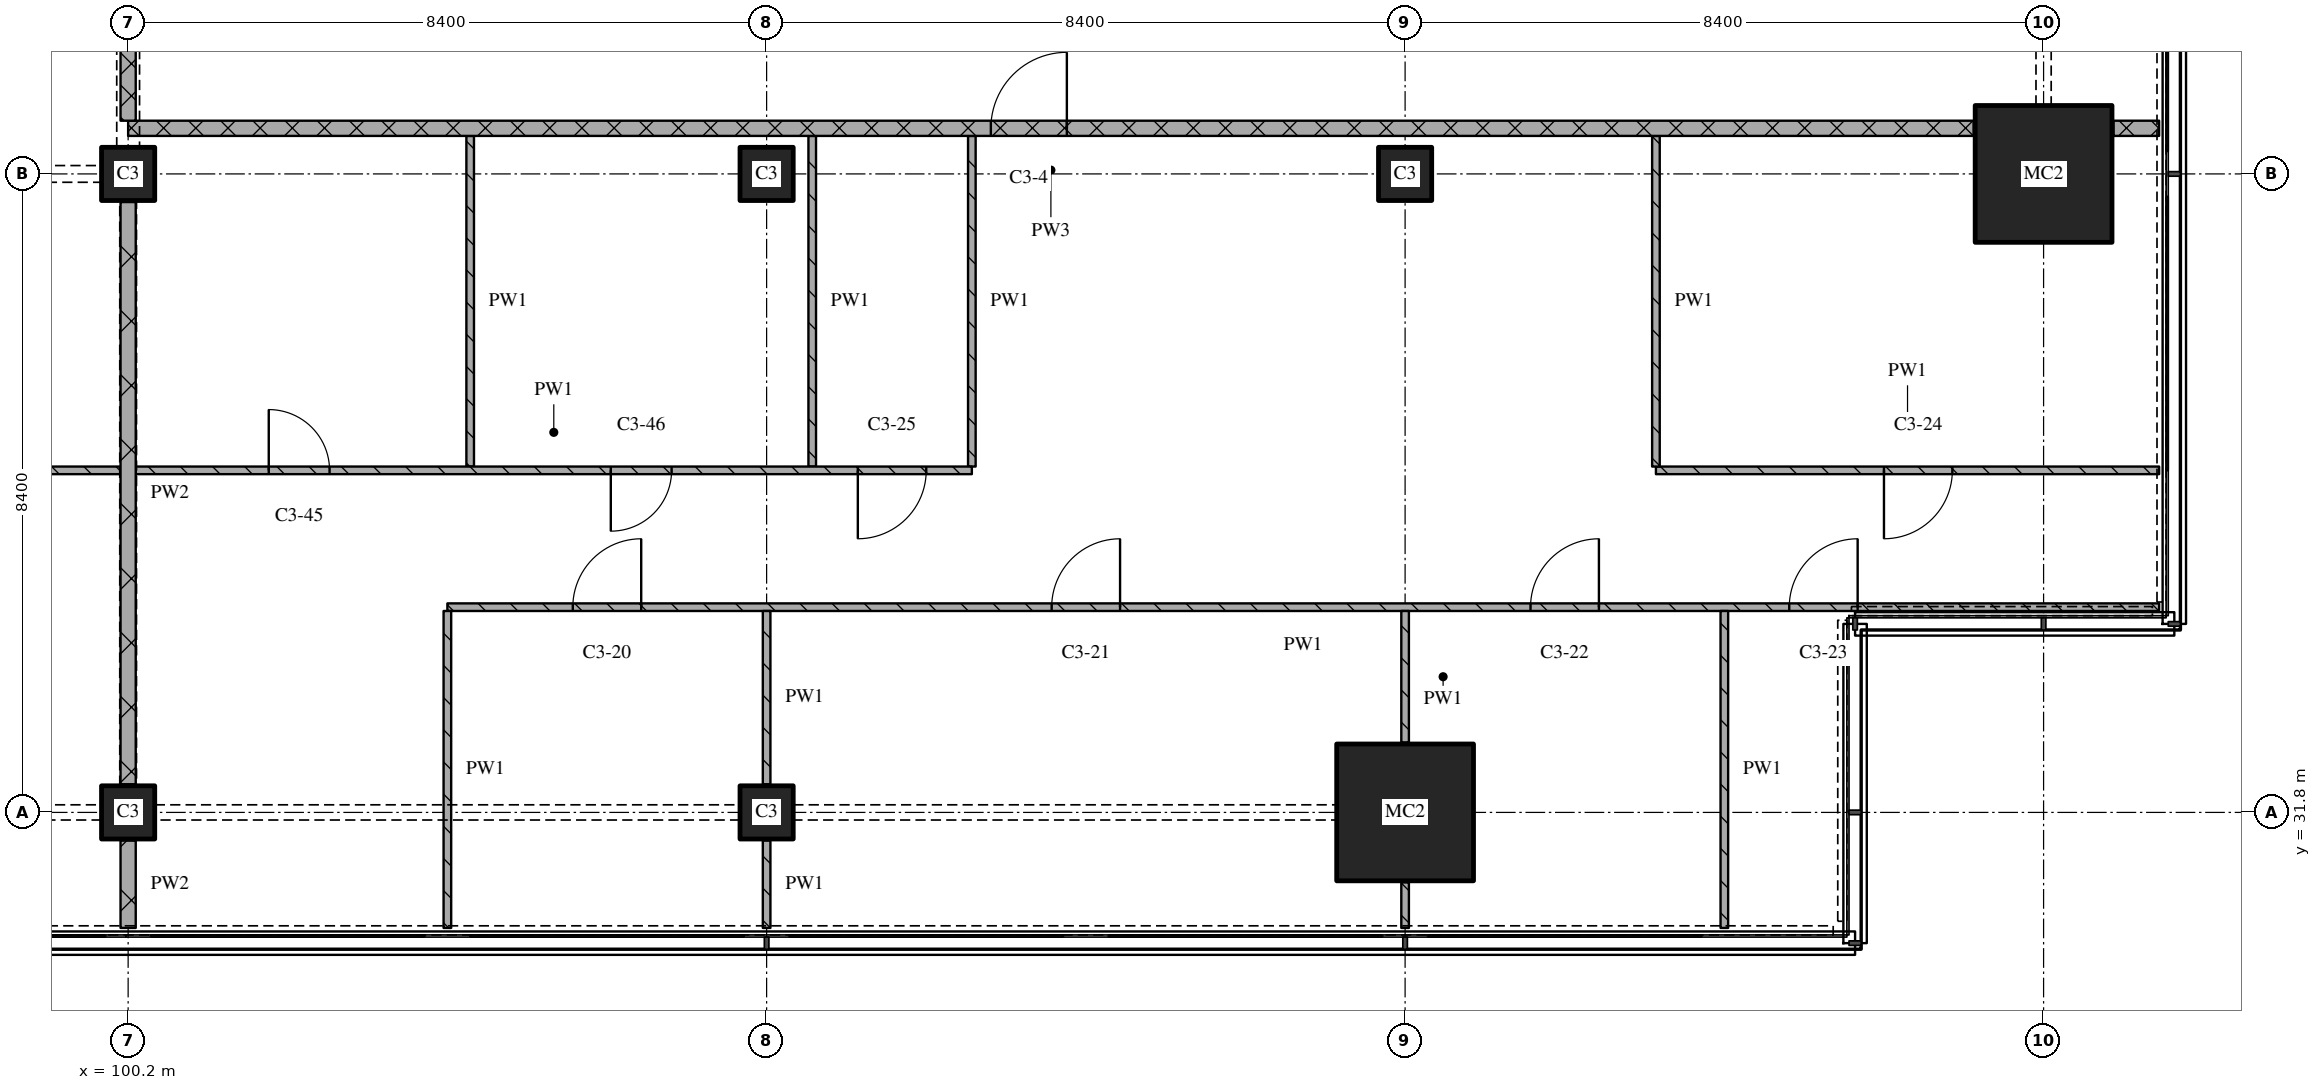
"""IFC4 building model, lengths in metres.
Left out: names, types, materials, properties, quantities, classifications, styles, units other than length and angle.
Written with IfcOpenShell. Run it as: python <this file> out.ifc"""

import sys

from ifc_helpers import new_model, si_unit, direction, frame, frame_2d, origin, origin_2d, place, context, subcontext, project, spatial, rectangle, extrude, element, fill, save


model = new_model("IFC4")
c1 = context("Model", 3, precision=1e-05, world=origin(), true_north=direction((0.0, 1.0)))
c2 = subcontext(c1, "Body", "Model", "MODEL_VIEW")
j1 = project(units=[si_unit("LENGTHUNIT", "METRE"), si_unit("PLANEANGLEUNIT", "RADIAN")], contexts=[c1])
p1 = place(None, origin())
s1 = spatial("IfcSite", under=j1, at=p1, CompositionType="ELEMENT")
p2 = place(p1, origin())
s2 = spatial("IfcBuilding", under=s1, at=p2, CompositionType="ELEMENT")
p3 = place(p2, frame((0.0, 0.0, 176.25)))
s3 = spatial("IfcBuildingStorey", under=s2, at=p3, CompositionType="ELEMENT", Elevation=176.25)
for number, where, z_axis, x_axis in (
    (1, (100.2, 31.8, 0.0), (0.0, 0.0, 1.0), (1.0, 0.0, 0.0)),
    (2, (100.2, 40.2, 0.0), (0.0, 0.0, 1.0), (1.0, 0.0, 0.0)),
    (3, (108.6, 31.8, 0.0), (0.0, 0.0, 1.0), (1.0, 0.0, 0.0)),
    (4, (108.6, 40.2, 0.0), (0.0, 0.0, 1.0), (1.0, 0.0, 0.0)),
):
    element("IfcColumn", number, at=place(p3, frame(where, z_axis=z_axis, x_axis=x_axis)), inside=s3, PredefinedType="COLUMN", context=c2, shape_type="SweptSolid", body=[
        extrude(rectangle(XDim=0.7, YDim=0.7, at=origin_2d()), origin(), (0.0, 0.0, 1.0), 3.6),
    ])
p4 = place(p3, frame((117.0, 31.8, 0.0), z_axis=(0.0, 0.0, 1.0), x_axis=(1.0, 0.0, 0.0)))
e5 = element("IfcColumn", 5, at=p4, inside=s3, PredefinedType="COLUMN", context=c2, shape_type="SweptSolid", body=[
    extrude(rectangle(XDim=1.8, YDim=1.8, at=origin_2d()), origin(), (0.0, 0.0, 1.0), 3.6),
])
p5 = place(p3, frame((117.0, 40.2, 0.0), z_axis=(0.0, 0.0, 1.0), x_axis=(1.0, 0.0, 0.0)))
e6 = element("IfcColumn", 6, at=p5, inside=s3, PredefinedType="COLUMN", context=c2, shape_type="SweptSolid", body=[
    extrude(rectangle(XDim=0.7, YDim=0.7, at=origin_2d()), origin(), (0.0, 0.0, 1.0), 3.6),
])
p6 = place(p3, frame((125.4, 40.2, 0.0), z_axis=(0.0, 0.0, 1.0), x_axis=(1.0, 0.0, 0.0)))
e7 = element("IfcColumn", 7, at=p6, inside=s3, PredefinedType="COLUMN", context=c2, shape_type="SweptSolid", body=[
    extrude(rectangle(XDim=1.8, YDim=1.8, at=origin_2d()), origin(), (0.0, 0.0, 1.0), 3.6),
])
p7 = place(p3, frame((126.92, 34.5, 0.0), z_axis=(0.0, 0.0, 1.0), x_axis=(-1.0, 0.0, 0.0)))
e8 = element("IfcWall", 8, at=p7, inside=s3, PredefinedType="PARTITIONING", context=c2, shape_type="SweptSolid", body=[
    extrude(rectangle(XDim=22.52, YDim=0.1, at=frame_2d((11.26, 0.0))), origin(), (0.0, 0.0, 1.0), 3.32),
])
p8 = place(p7, frame((3.966, 0.0, 0.0)))
e9 = element("IfcOpeningElement", 9, at=p8, cuts=e8, PredefinedType="OPENING", context=c2, shape_type="SweptSolid", body=[
    extrude(rectangle(XDim=0.9, YDim=2.1, at=frame_2d((0.45, 1.05))), frame((0.0, 0.06, 0.0), z_axis=(0.0, -1.0, 0.0), x_axis=(1.0, 0.0, 0.0)), (0.0, 0.0, 1.0), 0.12),
])
p9 = place(p7, frame((7.37, 0.0, 0.0)))
e10 = element("IfcOpeningElement", 10, at=p9, cuts=e8, PredefinedType="OPENING", context=c2, shape_type="SweptSolid", body=[
    extrude(rectangle(XDim=0.9, YDim=2.1, at=frame_2d((0.45, 1.05))), frame((0.0, 0.06, 0.0), z_axis=(0.0, -1.0, 0.0), x_axis=(1.0, 0.0, 0.0)), (0.0, 0.0, 1.0), 0.12),
])
p10 = place(p7, frame((13.67, 0.0, 0.0)))
e11 = element("IfcOpeningElement", 11, at=p10, cuts=e8, PredefinedType="OPENING", context=c2, shape_type="SweptSolid", body=[
    extrude(rectangle(XDim=0.9, YDim=2.1, at=frame_2d((0.45, 1.05))), frame((0.0, 0.06, 0.0), z_axis=(0.0, -1.0, 0.0), x_axis=(1.0, 0.0, 0.0)), (0.0, 0.0, 1.0), 0.12),
])
p11 = place(p7, frame((19.97, 0.0, 0.0)))
e12 = element("IfcOpeningElement", 12, at=p11, cuts=e8, PredefinedType="OPENING", context=c2, shape_type="SweptSolid", body=[
    extrude(rectangle(XDim=0.9, YDim=2.1, at=frame_2d((0.45, 1.05))), frame((0.0, 0.06, 0.0), z_axis=(0.0, -1.0, 0.0), x_axis=(1.0, 0.0, 0.0)), (0.0, 0.0, 1.0), 0.12),
])
p12 = place(p3, frame((120.3, 36.3, 0.0), z_axis=(0.0, 0.0, 1.0), x_axis=(1.0, 0.0, 0.0)))
e13 = element("IfcWall", 13, at=p12, inside=s3, PredefinedType="PARTITIONING", context=c2, shape_type="SweptSolid", body=[
    extrude(rectangle(XDim=6.62, YDim=0.1, at=frame_2d((3.31, 0.0))), origin(), (0.0, 0.0, 1.0), 3.32),
])
p13 = place(p12, frame((3.0, 0.0, 0.0)))
e14 = element("IfcOpeningElement", 14, at=p13, cuts=e13, PredefinedType="OPENING", context=c2, shape_type="SweptSolid", body=[
    extrude(rectangle(XDim=0.9, YDim=2.1, at=frame_2d((0.45, 1.05))), frame((0.0, 0.06, 0.0), z_axis=(0.0, -1.0, 0.0), x_axis=(1.0, 0.0, 0.0)), (0.0, 0.0, 1.0), 0.12),
])
p14 = place(p3, frame((124.48, 40.8, 0.0), z_axis=(0.0, 0.0, 1.0), x_axis=(-1.0, 0.0, 0.0)))
e15 = element("IfcWall", 15, at=p14, inside=s3, PredefinedType="PARTITIONING", context=c2, shape_type="SweptSolid", body=[
    extrude(rectangle(XDim=24.28, YDim=0.2, at=frame_2d((12.14, 0.0))), origin(), (0.0, 0.0, 1.0), 3.32),
])
p15 = place(p14, frame((11.93, 0.0, 0.0)))
e16 = element("IfcOpeningElement", 16, at=p15, cuts=e15, PredefinedType="OPENING", context=c2, shape_type="SweptSolid", body=[
    extrude(rectangle(XDim=1.0, YDim=2.1, at=frame_2d((0.5, 1.05))), frame((0.0, 0.11, 0.0), z_axis=(0.0, -1.0, 0.0), x_axis=(1.0, 0.0, 0.0)), (0.0, 0.0, 1.0), 0.22),
])
p16 = place(p3, frame((126.32, 40.8, 0.0), z_axis=(0.0, 0.0, 1.0), x_axis=(1.0, 0.0, 0.0)))
e17 = element("IfcWall", 17, at=p16, inside=s3, PredefinedType="PARTITIONING", context=c2, shape_type="SweptSolid", body=[
    extrude(rectangle(XDim=0.6, YDim=0.2, at=frame_2d((0.3, 0.0))), origin(), (0.0, 0.0, 1.0), 3.32),
])
p17 = place(p3, frame((100.2, 43.1, 0.0), z_axis=(0.0, 0.0, 1.0), x_axis=(0.0, -1.0, 0.0)))
e18 = element("IfcWall", 18, at=p17, inside=s3, PredefinedType="PARTITIONING", context=c2, shape_type="SweptSolid", body=[
    extrude(rectangle(XDim=2.2, YDim=0.2, at=frame_2d((1.1, 0.0))), origin(), (0.0, 0.0, 1.0), 2.43),
])
p18 = place(p3, frame((100.2, 31.43, 0.0), z_axis=(0.0, 0.0, 1.0), x_axis=(0.0, -1.0, 0.0)))
e19 = element("IfcWall", 19, at=p18, inside=s3, PredefinedType="PARTITIONING", context=c2, shape_type="SweptSolid", body=[
    extrude(rectangle(XDim=1.15, YDim=0.2, at=frame_2d((0.575, 0.0))), origin(), (0.0, 0.0, 1.0), 3.32),
])
p19 = place(p3, frame((100.2, 39.83, 0.0), z_axis=(0.0, 0.0, 1.0), x_axis=(0.0, -1.0, 0.0)))
e20 = element("IfcWall", 20, at=p19, inside=s3, PredefinedType="PARTITIONING", context=c2, shape_type="SweptSolid", body=[
    extrude(rectangle(XDim=7.66, YDim=0.2, at=frame_2d((3.83, 0.0))), origin(), (0.0, 0.0, 1.0), 2.72),
])
p20 = place(p3, frame((104.4, 34.45, 0.0), z_axis=(0.0, 0.0, 1.0), x_axis=(0.0, -1.0, 0.0)))
e21 = element("IfcWall", 21, at=p20, inside=s3, PredefinedType="PARTITIONING", context=c2, shape_type="SweptSolid", body=[
    extrude(rectangle(XDim=4.17, YDim=0.1, at=frame_2d((2.085, 0.0))), origin(), (0.0, 0.0, 1.0), 3.32),
])
p21 = place(p3, frame((104.7, 40.7, 0.0), z_axis=(0.0, 0.0, 1.0), x_axis=(0.0, -1.0, 0.0)))
e22 = element("IfcWall", 22, at=p21, inside=s3, PredefinedType="PARTITIONING", context=c2, shape_type="SweptSolid", body=[
    extrude(rectangle(XDim=4.35, YDim=0.1, at=frame_2d((2.175, 0.0))), origin(), (0.0, 0.0, 1.0), 3.32),
])
p22 = place(p3, frame((108.6, 31.43, 0.0), z_axis=(0.0, 0.0, 1.0), x_axis=(0.0, -1.0, 0.0)))
e23 = element("IfcWall", 23, at=p22, inside=s3, PredefinedType="PARTITIONING", context=c2, shape_type="SweptSolid", body=[
    extrude(rectangle(XDim=1.15, YDim=0.1, at=frame_2d((0.575, 0.0))), origin(), (0.0, 0.0, 1.0), 3.32),
])
p23 = place(p3, frame((108.6, 34.45, 0.0), z_axis=(0.0, 0.0, 1.0), x_axis=(0.0, -1.0, 0.0)))
e24 = element("IfcWall", 24, at=p23, inside=s3, PredefinedType="PARTITIONING", context=c2, shape_type="SweptSolid", body=[
    extrude(rectangle(XDim=2.28, YDim=0.1, at=frame_2d((1.14, 0.0))), origin(), (0.0, 0.0, 1.0), 3.32),
])
for number, where, z_axis, x_axis in (
    (25, (109.2, 40.7, 0.0), (0.0, 0.0, 1.0), (0.0, -1.0, 0.0)),
    (26, (111.3, 40.7, 0.0), (0.0, 0.0, 1.0), (0.0, -1.0, 0.0)),
):
    element("IfcWall", number, at=place(p3, frame(where, z_axis=z_axis, x_axis=x_axis)), inside=s3, PredefinedType="PARTITIONING", context=c2, shape_type="SweptSolid", body=[
        extrude(rectangle(XDim=4.35, YDim=0.1, at=frame_2d((2.175, 0.0))), origin(), (0.0, 0.0, 1.0), 3.32),
    ])
p24 = place(p3, frame((117.0, 30.88, 0.0), z_axis=(0.0, 0.0, 1.0), x_axis=(0.0, -1.0, 0.0)))
e27 = element("IfcWall", 27, at=p24, inside=s3, PredefinedType="PARTITIONING", context=c2, shape_type="SweptSolid", body=[
    extrude(rectangle(XDim=0.6, YDim=0.1, at=frame_2d((0.3, 0.0))), origin(), (0.0, 0.0, 1.0), 3.32),
])
p25 = place(p3, frame((117.0, 34.45, 0.0), z_axis=(0.0, 0.0, 1.0), x_axis=(0.0, -1.0, 0.0)))
e28 = element("IfcWall", 28, at=p25, inside=s3, PredefinedType="PARTITIONING", context=c2, shape_type="SweptSolid", body=[
    extrude(rectangle(XDim=1.73, YDim=0.1, at=frame_2d((0.865, 0.0))), origin(), (0.0, 0.0, 1.0), 3.32),
])
p26 = place(p3, frame((120.3, 40.7, 0.0), z_axis=(0.0, 0.0, 1.0), x_axis=(0.0, -1.0, 0.0)))
e29 = element("IfcWall", 29, at=p26, inside=s3, PredefinedType="PARTITIONING", context=c2, shape_type="SweptSolid", body=[
    extrude(rectangle(XDim=4.35, YDim=0.1, at=frame_2d((2.175, 0.0))), origin(), (0.0, 0.0, 1.0), 3.32),
])
p27 = place(p3, frame((121.2, 34.45, 0.0), z_axis=(0.0, 0.0, 1.0), x_axis=(0.0, -1.0, 0.0)))
e30 = element("IfcWall", 30, at=p27, inside=s3, PredefinedType="PARTITIONING", context=c2, shape_type="SweptSolid", body=[
    extrude(rectangle(XDim=4.17, YDim=0.1, at=frame_2d((2.085, 0.0))), origin(), (0.0, 0.0, 1.0), 3.32),
])
p28 = place(p3, frame((100.1, 36.3, 0.0), z_axis=(0.0, 0.0, 1.0), x_axis=(-1.0, 0.0, 0.0)))
e31 = element("IfcWall", 31, at=p28, inside=s3, PredefinedType="PARTITIONING", context=c2, shape_type="SweptSolid", body=[
    extrude(rectangle(XDim=4.1, YDim=0.1, at=frame_2d((2.05, 0.0))), origin(), (0.0, 0.0, 1.0), 3.32),
])
p29 = place(p28, frame((1.55, 0.0, 0.0)))
e32 = element("IfcOpeningElement", 32, at=p29, cuts=e31, PredefinedType="OPENING", context=c2, shape_type="SweptSolid", body=[
    extrude(rectangle(XDim=0.9, YDim=2.1, at=frame_2d((0.45, 1.05))), frame((0.0, 0.06, 0.0), z_axis=(0.0, -1.0, 0.0), x_axis=(1.0, 0.0, 0.0)), (0.0, 0.0, 1.0), 0.12),
])
p30 = place(p3, frame((100.3, 36.3, 0.0), z_axis=(0.0, 0.0, 1.0), x_axis=(1.0, 0.0, 0.0)))
e33 = element("IfcWall", 33, at=p30, inside=s3, PredefinedType="PARTITIONING", context=c2, shape_type="SweptSolid", body=[
    extrude(rectangle(XDim=11.0, YDim=0.1, at=frame_2d((5.5, 0.0))), origin(), (0.0, 0.0, 1.0), 3.32),
])
p31 = place(p30, frame((1.75, 0.0, 0.0)))
e34 = element("IfcOpeningElement", 34, at=p31, cuts=e33, PredefinedType="OPENING", context=c2, shape_type="SweptSolid", body=[
    extrude(rectangle(XDim=0.8, YDim=2.1, at=frame_2d((0.4, 1.05))), frame((0.0, 0.06, 0.0), z_axis=(0.0, -1.0, 0.0), x_axis=(1.0, 0.0, 0.0)), (0.0, 0.0, 1.0), 0.12),
])
p32 = place(p30, frame((6.25, 0.0, 0.0)))
e35 = element("IfcOpeningElement", 35, at=p32, cuts=e33, PredefinedType="OPENING", context=c2, shape_type="SweptSolid", body=[
    extrude(rectangle(XDim=0.8, YDim=2.1, at=frame_2d((0.4, 1.05))), frame((0.0, 0.06, 0.0), z_axis=(0.0, -1.0, 0.0), x_axis=(1.0, 0.0, 0.0)), (0.0, 0.0, 1.0), 0.12),
])
p33 = place(p30, frame((9.5, 0.0, 0.0)))
e36 = element("IfcOpeningElement", 36, at=p33, cuts=e33, PredefinedType="OPENING", context=c2, shape_type="SweptSolid", body=[
    extrude(rectangle(XDim=0.9, YDim=2.1, at=frame_2d((0.45, 1.05))), frame((0.0, 0.06, 0.0), z_axis=(0.0, -1.0, 0.0), x_axis=(1.0, 0.0, 0.0)), (0.0, 0.0, 1.0), 0.12),
])
p34 = place(p8, origin())
e37 = element("IfcDoor", 37, at=p34, inside=s3, OperationType="SINGLE_SWING_RIGHT", PredefinedType="DOOR", context=c2, shape_type="SweptSolid", body=[
    extrude(rectangle(XDim=0.9, YDim=2.1, at=frame_2d((0.45, 1.05))), frame((0.0, 0.025, 0.0), z_axis=(0.0, -1.0, 0.0), x_axis=(1.0, 0.0, 0.0)), (0.0, 0.0, 1.0), 0.05),
])
fill(e9, e37)
p35 = place(p9, origin())
e38 = element("IfcDoor", 38, at=p35, inside=s3, OperationType="SINGLE_SWING_RIGHT", PredefinedType="DOOR", context=c2, shape_type="SweptSolid", body=[
    extrude(rectangle(XDim=0.9, YDim=2.1, at=frame_2d((0.45, 1.05))), frame((0.0, 0.025, 0.0), z_axis=(0.0, -1.0, 0.0), x_axis=(1.0, 0.0, 0.0)), (0.0, 0.0, 1.0), 0.05),
])
fill(e10, e38)
p36 = place(p10, origin())
e39 = element("IfcDoor", 39, at=p36, inside=s3, OperationType="SINGLE_SWING_RIGHT", PredefinedType="DOOR", context=c2, shape_type="SweptSolid", body=[
    extrude(rectangle(XDim=0.9, YDim=2.1, at=frame_2d((0.45, 1.05))), frame((0.0, 0.025, 0.0), z_axis=(0.0, -1.0, 0.0), x_axis=(1.0, 0.0, 0.0)), (0.0, 0.0, 1.0), 0.05),
])
fill(e11, e39)
p37 = place(p11, origin())
e40 = element("IfcDoor", 40, at=p37, inside=s3, OperationType="SINGLE_SWING_RIGHT", PredefinedType="DOOR", context=c2, shape_type="SweptSolid", body=[
    extrude(rectangle(XDim=0.9, YDim=2.1, at=frame_2d((0.45, 1.05))), frame((0.0, 0.025, 0.0), z_axis=(0.0, -1.0, 0.0), x_axis=(1.0, 0.0, 0.0)), (0.0, 0.0, 1.0), 0.05),
])
fill(e12, e40)
p38 = place(p13, origin())
e41 = element("IfcDoor", 41, at=p38, inside=s3, OperationType="SINGLE_SWING_RIGHT", PredefinedType="DOOR", context=c2, shape_type="SweptSolid", body=[
    extrude(rectangle(XDim=0.9, YDim=2.1, at=frame_2d((0.45, 1.05))), frame((0.0, 0.025, 0.0), z_axis=(0.0, -1.0, 0.0), x_axis=(1.0, 0.0, 0.0)), (0.0, 0.0, 1.0), 0.05),
])
fill(e14, e41)
p39 = place(p15, origin())
e42 = element("IfcDoor", 42, at=p39, inside=s3, OperationType="SINGLE_SWING_RIGHT", PredefinedType="DOOR", context=c2, shape_type="SweptSolid", body=[
    extrude(rectangle(XDim=1.0, YDim=2.1, at=frame_2d((0.5, 1.05))), frame((0.0, 0.025, 0.0), z_axis=(0.0, -1.0, 0.0), x_axis=(1.0, 0.0, 0.0)), (0.0, 0.0, 1.0), 0.05),
])
fill(e16, e42)
p40 = place(p31, origin())
e43 = element("IfcDoor", 43, at=p40, inside=s3, OperationType="SINGLE_SWING_LEFT", PredefinedType="DOOR", context=c2, shape_type="SweptSolid", body=[
    extrude(rectangle(XDim=0.8, YDim=2.1, at=frame_2d((0.4, 1.05))), frame((0.0, 0.025, 0.0), z_axis=(0.0, -1.0, 0.0), x_axis=(1.0, 0.0, 0.0)), (0.0, 0.0, 1.0), 0.05),
])
fill(e34, e43)
p41 = place(p32, origin())
e44 = element("IfcDoor", 44, at=p41, inside=s3, OperationType="SINGLE_SWING_RIGHT", PredefinedType="DOOR", context=c2, shape_type="SweptSolid", body=[
    extrude(rectangle(XDim=0.8, YDim=2.1, at=frame_2d((0.4, 1.05))), frame((0.0, 0.025, 0.0), z_axis=(0.0, -1.0, 0.0), x_axis=(1.0, 0.0, 0.0)), (0.0, 0.0, 1.0), 0.05),
])
fill(e35, e44)
p42 = place(p33, origin())
e45 = element("IfcDoor", 45, at=p42, inside=s3, OperationType="SINGLE_SWING_RIGHT", PredefinedType="DOOR", context=c2, shape_type="SweptSolid", body=[
    extrude(rectangle(XDim=0.9, YDim=2.1, at=frame_2d((0.45, 1.05))), frame((0.0, 0.025, 0.0), z_axis=(0.0, -1.0, 0.0), x_axis=(1.0, 0.0, 0.0)), (0.0, 0.0, 1.0), 0.05),
])
fill(e36, e45)
save(model, sys.argv[1])
